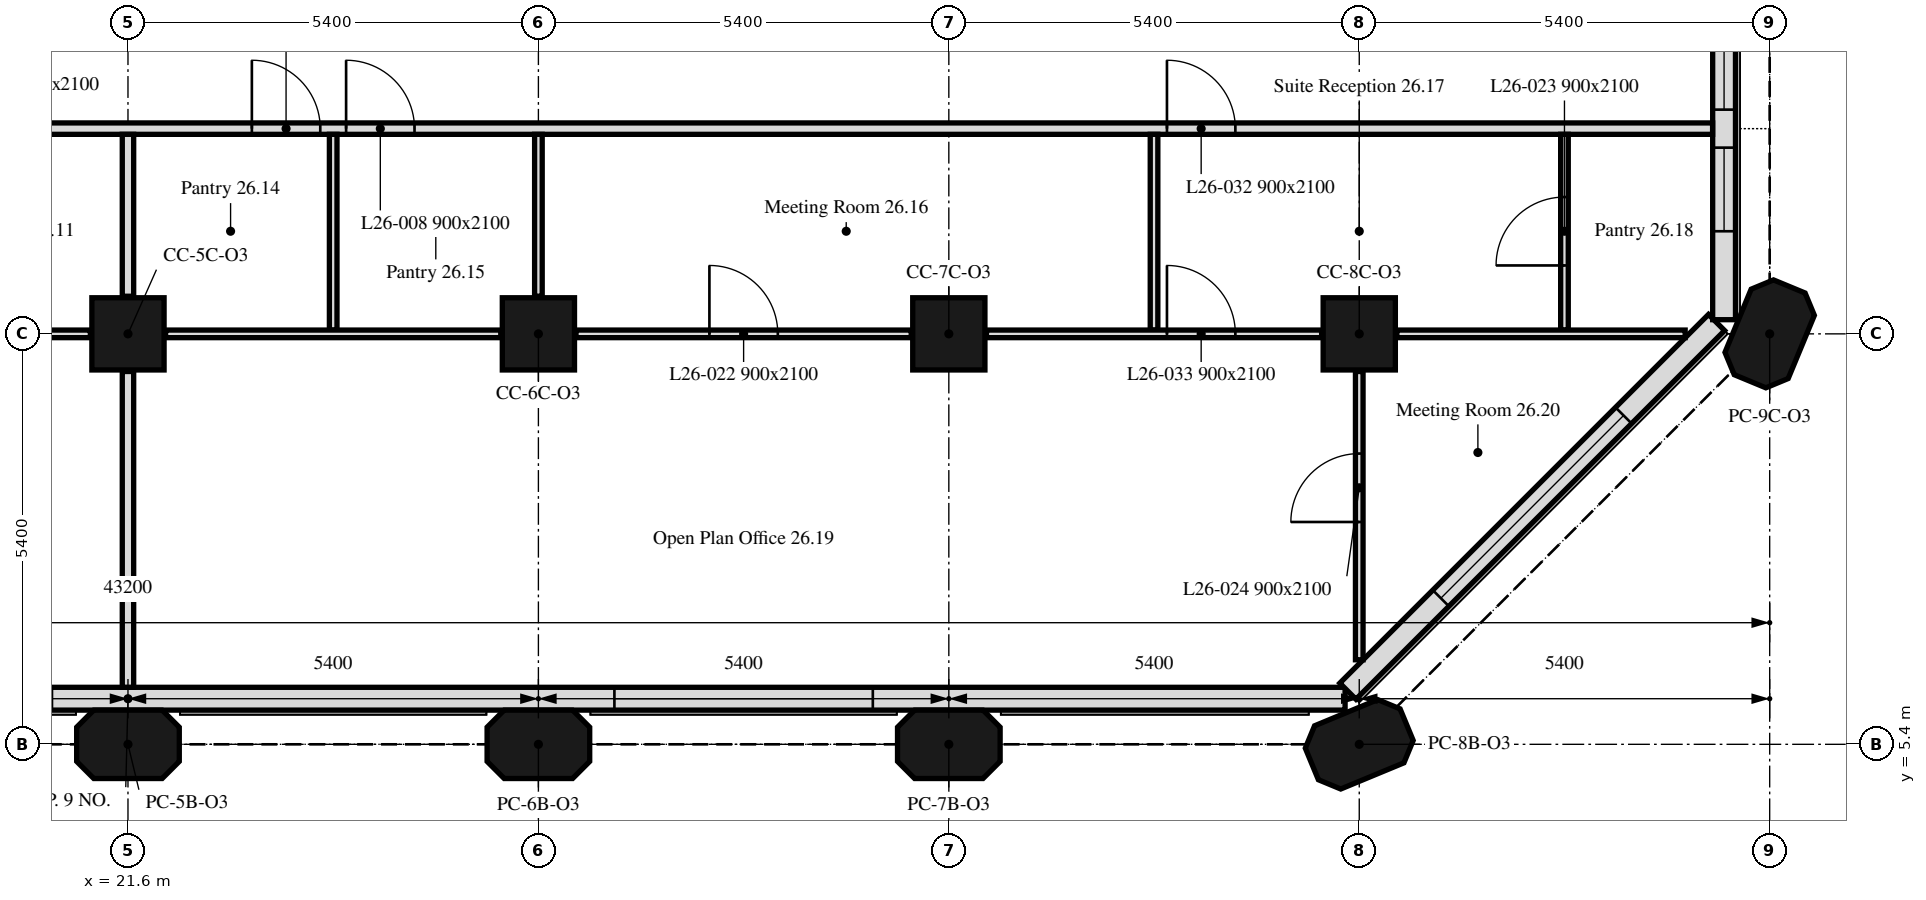
"""IFC4 building model, lengths in metres.
Left out: names, types, materials, properties, quantities, classifications, styles, units other than length and angle.
Written with IfcOpenShell. Run it as: python <this file> out.ifc"""

import sys

from ifc_helpers import new_model, si_unit, direction, frame, frame_2d, origin, origin_2d, place, context, subcontext, project, spatial, polyline, rectangle, outline, extrude, element, fill, save


model = new_model("IFC4")
c1 = context("Model", 3, precision=1e-05, world=origin(), true_north=direction((0.0, 1.0)))
c2 = subcontext(c1, "Body", "Model", "MODEL_VIEW")
j1 = project(units=[si_unit("LENGTHUNIT", "METRE"), si_unit("PLANEANGLEUNIT", "RADIAN")], contexts=[c1])
p1 = place(None, origin())
s1 = spatial("IfcSite", under=j1, at=p1, CompositionType="ELEMENT")
p2 = place(p1, origin())
s2 = spatial("IfcBuilding", under=s1, at=p2, CompositionType="ELEMENT")
p3 = place(p2, frame((0.0, 0.0, 110.6)))
s3 = spatial("IfcBuildingStorey", under=s2, at=p3, CompositionType="ELEMENT", Elevation=110.6)
for number, where, z_axis, x_axis in (
    (1, (21.6, 5.4, 0.0), (0.0, 0.0, 1.0), (1.0, 0.0, 0.0)),
    (2, (27.0, 5.4, 0.0), (0.0, 0.0, 1.0), (1.0, 0.0, 0.0)),
    (3, (32.4, 5.4, 0.0), (0.0, 0.0, 1.0), (1.0, 0.0, 0.0)),
    (4, (37.8, 5.4, 0.0), (0.0, 0.0, 1.0), (0.924, 0.383, 0.0)),
):
    element("IfcColumn", number, at=place(p3, frame(where, z_axis=z_axis, x_axis=x_axis)), inside=s3, PredefinedType="COLUMN", context=c2, shape_type="SweptSolid", body=[
        extrude(outline(polyline([(-0.45, -0.45), (0.45, -0.45), (0.675, -0.225), (0.675, 0.225), (0.45, 0.45), (-0.45, 0.45), (-0.675, 0.225), (-0.675, -0.225), (-0.45, -0.45)])), origin(), (0.0, 0.0, 1.0), 3.5),
    ])
for number, where, z_axis, x_axis in (
    (5, (21.6, 10.8, 0.0), (0.0, 0.0, 1.0), (1.0, 0.0, 0.0)),
    (6, (27.0, 10.8, 0.0), (0.0, 0.0, 1.0), (1.0, 0.0, 0.0)),
    (7, (32.4, 10.8, 0.0), (0.0, 0.0, 1.0), (1.0, 0.0, 0.0)),
    (8, (37.8, 10.8, 0.0), (0.0, 0.0, 1.0), (1.0, 0.0, 0.0)),
):
    element("IfcColumn", number, at=place(p3, frame(where, z_axis=z_axis, x_axis=x_axis)), inside=s3, PredefinedType="COLUMN", context=c2, shape_type="SweptSolid", body=[
        extrude(rectangle(XDim=0.95, YDim=0.95, at=origin_2d()), origin(), (0.0, 0.0, 1.0), 3.5),
    ])
p4 = place(p3, frame((43.2, 10.8, 0.0), z_axis=(0.0, 0.0, 1.0), x_axis=(0.382683432365, 0.923879532511, 0.0)))
e9 = element("IfcColumn", 9, at=p4, inside=s3, PredefinedType="COLUMN", context=c2, shape_type="SweptSolid", body=[
    extrude(outline(polyline([(-0.45, -0.45), (0.45, -0.45), (0.675, -0.225), (0.675, 0.225), (0.45, 0.45), (-0.45, 0.45), (-0.675, 0.225), (-0.675, -0.225), (-0.45, -0.45)])), origin(), (0.0, 0.0, 1.0), 3.5),
])
p5 = place(p3, frame((5.586, 6.0, 0.0), z_axis=(0.0, 0.0, 1.0), x_axis=(1.0, 0.0, 0.0)))
e10 = element("IfcWall", 10, at=p5, inside=s3, PredefinedType="SOLIDWALL", context=c2, shape_type="SweptSolid", body=[
    extrude(rectangle(XDim=32.027, YDim=0.3, at=frame_2d((16.014, 0.0))), origin(), (0.0, 0.0, 1.0), 3.5),
])
p6 = place(p5, frame((0.814, 0.0, 0.9)))
e11 = element("IfcOpeningElement", 11, at=p6, cuts=e10, PredefinedType="OPENING", context=c2, shape_type="SweptSolid", body=[
    extrude(rectangle(XDim=3.4, YDim=1.7, at=frame_2d((1.7, 0.85))), frame((0.0, 0.16, 0.0), z_axis=(0.0, -1.0, 0.0), x_axis=(1.0, 0.0, 0.0)), (0.0, 0.0, 1.0), 0.32),
])
p7 = place(p5, frame((11.614, 0.0, 0.9)))
e12 = element("IfcOpeningElement", 12, at=p7, cuts=e10, PredefinedType="OPENING", context=c2, shape_type="SweptSolid", body=[
    extrude(rectangle(XDim=3.4, YDim=1.7, at=frame_2d((1.7, 0.85))), frame((0.0, 0.16, 0.0), z_axis=(0.0, -1.0, 0.0), x_axis=(1.0, 0.0, 0.0)), (0.0, 0.0, 1.0), 0.32),
])
p8 = place(p5, frame((22.414, 0.0, 0.9)))
e13 = element("IfcOpeningElement", 13, at=p8, cuts=e10, PredefinedType="OPENING", context=c2, shape_type="SweptSolid", body=[
    extrude(rectangle(XDim=3.4, YDim=1.7, at=frame_2d((1.7, 0.85))), frame((0.0, 0.16, 0.0), z_axis=(0.0, -1.0, 0.0), x_axis=(1.0, 0.0, 0.0)), (0.0, 0.0, 1.0), 0.32),
])
p9 = place(p3, frame((37.65, 6.099, 0.0), z_axis=(0.0, 0.0, 1.0), x_axis=(0.707106781187, 0.707106781187, 0.0)))
e14 = element("IfcWall", 14, at=p9, inside=s3, PredefinedType="SOLIDWALL", context=c2, shape_type="SweptSolid", body=[
    extrude(rectangle(XDim=6.86, YDim=0.3, at=frame_2d((3.43, 0.0))), origin(), (0.0, 0.0, 1.0), 3.5),
])
p10 = place(p9, frame((1.73, 0.0, 0.9)))
e15 = element("IfcOpeningElement", 15, at=p10, cuts=e14, PredefinedType="OPENING", context=c2, shape_type="SweptSolid", body=[
    extrude(rectangle(XDim=3.4, YDim=1.7, at=frame_2d((1.7, 0.85))), frame((0.0, 0.16, 0.0), z_axis=(0.0, -1.0, 0.0), x_axis=(1.0, 0.0, 0.0)), (0.0, 0.0, 1.0), 0.32),
])
p11 = place(p3, frame((42.6, 10.986, 0.0), z_axis=(0.0, 0.0, 1.0), x_axis=(0.0, 1.0, 0.0)))
e16 = element("IfcWall", 16, at=p11, inside=s3, PredefinedType="SOLIDWALL", context=c2, shape_type="SweptSolid", body=[
    extrude(rectangle(XDim=5.214, YDim=0.3, at=frame_2d((2.607, 0.0))), origin(), (0.0, 0.0, 1.0), 3.5),
])
p12 = place(p11, frame((1.164, 0.0, 0.9)))
e17 = element("IfcOpeningElement", 17, at=p12, cuts=e16, PredefinedType="OPENING", context=c2, shape_type="SweptSolid", body=[
    extrude(rectangle(XDim=1.1, YDim=1.7, at=frame_2d((0.55, 0.85))), frame((0.0, 0.16, 0.0), z_axis=(0.0, -1.0, 0.0), x_axis=(1.0, 0.0, 0.0)), (0.0, 0.0, 1.0), 0.32),
])
p13 = place(p11, frame((2.764, 0.0, 0.9)))
e18 = element("IfcOpeningElement", 18, at=p13, cuts=e16, PredefinedType="OPENING", context=c2, shape_type="SweptSolid", body=[
    extrude(rectangle(XDim=1.1, YDim=1.7, at=frame_2d((0.55, 0.85))), frame((0.0, 0.16, 0.0), z_axis=(0.0, -1.0, 0.0), x_axis=(1.0, 0.0, 0.0)), (0.0, 0.0, 1.0), 0.32),
])
p14 = place(p3, frame((0.751, 13.5, 0.0), z_axis=(0.0, 0.0, 1.0), x_axis=(1.0, 0.0, 0.0)))
e19 = element("IfcWall", 19, at=p14, inside=s3, PredefinedType="PARTITIONING", context=c2, shape_type="SweptSolid", body=[
    extrude(rectangle(XDim=41.698, YDim=0.15, at=frame_2d((20.849, 0.0))), origin(), (0.0, 0.0, 1.0), 3.5),
])
p15 = place(p14, frame((6.279, 0.0, 0.0)))
e20 = element("IfcOpeningElement", 20, at=p15, cuts=e19, PredefinedType="OPENING", context=c2, shape_type="SweptSolid", body=[
    extrude(rectangle(XDim=0.9, YDim=2.1, at=frame_2d((0.45, 1.05))), frame((0.0, 0.075, 0.0), z_axis=(0.0, -1.0, 0.0), x_axis=(1.0, 0.0, 0.0)), (0.0, 0.0, 1.0), 0.15),
])
p16 = place(p14, frame((7.519, 0.0, 0.0)))
e21 = element("IfcOpeningElement", 21, at=p16, cuts=e19, PredefinedType="OPENING", context=c2, shape_type="SweptSolid", body=[
    extrude(rectangle(XDim=0.9, YDim=2.1, at=frame_2d((0.45, 1.05))), frame((0.0, 0.075, 0.0), z_axis=(0.0, -1.0, 0.0), x_axis=(1.0, 0.0, 0.0)), (0.0, 0.0, 1.0), 0.15),
])
p17 = place(p14, frame((11.679, 0.0, 0.0)))
e22 = element("IfcOpeningElement", 22, at=p17, cuts=e19, PredefinedType="OPENING", context=c2, shape_type="SweptSolid", body=[
    extrude(rectangle(XDim=0.9, YDim=2.1, at=frame_2d((0.45, 1.05))), frame((0.0, 0.075, 0.0), z_axis=(0.0, -1.0, 0.0), x_axis=(1.0, 0.0, 0.0)), (0.0, 0.0, 1.0), 0.15),
])
p18 = place(p14, frame((22.479, 0.0, 0.0)))
e23 = element("IfcOpeningElement", 23, at=p18, cuts=e19, PredefinedType="OPENING", context=c2, shape_type="SweptSolid", body=[
    extrude(rectangle(XDim=0.9, YDim=2.1, at=frame_2d((0.45, 1.05))), frame((0.0, 0.075, 0.0), z_axis=(0.0, -1.0, 0.0), x_axis=(1.0, 0.0, 0.0)), (0.0, 0.0, 1.0), 0.15),
])
p19 = place(p14, frame((23.719, 0.0, 0.0)))
e24 = element("IfcOpeningElement", 24, at=p19, cuts=e19, PredefinedType="OPENING", context=c2, shape_type="SweptSolid", body=[
    extrude(rectangle(XDim=0.9, YDim=2.1, at=frame_2d((0.45, 1.05))), frame((0.0, 0.075, 0.0), z_axis=(0.0, -1.0, 0.0), x_axis=(1.0, 0.0, 0.0)), (0.0, 0.0, 1.0), 0.15),
])
p20 = place(p14, frame((2.174, 0.0, 0.0)))
e25 = element("IfcOpeningElement", 25, at=p20, cuts=e19, PredefinedType="OPENING", context=c2, shape_type="SweptSolid", body=[
    extrude(rectangle(XDim=0.9, YDim=2.1, at=frame_2d((0.45, 1.05))), frame((0.0, 0.075, 0.0), z_axis=(0.0, -1.0, 0.0), x_axis=(1.0, 0.0, 0.0)), (0.0, 0.0, 1.0), 0.15),
])
p21 = place(p14, frame((17.079, 0.0, 0.0)))
e26 = element("IfcOpeningElement", 26, at=p21, cuts=e19, PredefinedType="OPENING", context=c2, shape_type="SweptSolid", body=[
    extrude(rectangle(XDim=0.9, YDim=2.1, at=frame_2d((0.45, 1.05))), frame((0.0, 0.075, 0.0), z_axis=(0.0, -1.0, 0.0), x_axis=(1.0, 0.0, 0.0)), (0.0, 0.0, 1.0), 0.15),
])
p22 = place(p14, frame((34.519, 0.0, 0.0)))
e27 = element("IfcOpeningElement", 27, at=p22, cuts=e19, PredefinedType="OPENING", context=c2, shape_type="SweptSolid", body=[
    extrude(rectangle(XDim=0.9, YDim=2.1, at=frame_2d((0.45, 1.05))), frame((0.0, 0.075, 0.0), z_axis=(0.0, -1.0, 0.0), x_axis=(1.0, 0.0, 0.0)), (0.0, 0.0, 1.0), 0.15),
])
p23 = place(p3, frame((16.695, 10.8, 0.0), z_axis=(0.0, 0.0, 1.0), x_axis=(1.0, 0.0, 0.0)))
e28 = element("IfcWall", 28, at=p23, inside=s3, PredefinedType="PARTITIONING", context=c2, shape_type="SweptSolid", body=[
    extrude(rectangle(XDim=4.41, YDim=0.1, at=frame_2d((2.205, 0.0))), origin(), (0.0, 0.0, 1.0), 3.5),
])
p24 = place(p3, frame((21.6, 11.295, 0.0), z_axis=(0.0, 0.0, 1.0), x_axis=(0.0, 1.0, 0.0)))
e29 = element("IfcWall", 29, at=p24, inside=s3, PredefinedType="PARTITIONING", context=c2, shape_type="SweptSolid", body=[
    extrude(rectangle(XDim=2.13, YDim=0.15, at=frame_2d((1.065, 0.0))), origin(), (0.0, 0.0, 1.0), 3.5),
])
p25 = place(p3, frame((21.6, 6.151, 0.0), z_axis=(0.0, 0.0, 1.0), x_axis=(0.0, 1.0, 0.0)))
e30 = element("IfcWall", 30, at=p25, inside=s3, PredefinedType="PARTITIONING", context=c2, shape_type="SweptSolid", body=[
    extrude(rectangle(XDim=4.154, YDim=0.15, at=frame_2d((2.077, 0.0))), origin(), (0.0, 0.0, 1.0), 3.5),
])
p26 = place(p3, frame((24.3, 10.85, 0.0), z_axis=(0.0, 0.0, 1.0), x_axis=(0.0, 1.0, 0.0)))
e31 = element("IfcWall", 31, at=p26, inside=s3, PredefinedType="PARTITIONING", context=c2, shape_type="SweptSolid", body=[
    extrude(rectangle(XDim=2.575, YDim=0.1, at=frame_2d((1.288, 0.0))), origin(), (0.0, 0.0, 1.0), 3.5),
])
p27 = place(p3, frame((22.095, 10.8, 0.0), z_axis=(0.0, 0.0, 1.0), x_axis=(1.0, 0.0, 0.0)))
e32 = element("IfcWall", 32, at=p27, inside=s3, PredefinedType="PARTITIONING", context=c2, shape_type="SweptSolid", body=[
    extrude(rectangle(XDim=4.41, YDim=0.1, at=frame_2d((2.205, 0.0))), origin(), (0.0, 0.0, 1.0), 3.5),
])
p28 = place(p3, frame((27.0, 11.295, 0.0), z_axis=(0.0, 0.0, 1.0), x_axis=(0.0, 1.0, 0.0)))
e33 = element("IfcWall", 33, at=p28, inside=s3, PredefinedType="PARTITIONING", context=c2, shape_type="SweptSolid", body=[
    extrude(rectangle(XDim=2.13, YDim=0.1, at=frame_2d((1.065, 0.0))), origin(), (0.0, 0.0, 1.0), 3.5),
])
p29 = place(p3, frame((27.495, 10.8, 0.0), z_axis=(0.0, 0.0, 1.0), x_axis=(1.0, 0.0, 0.0)))
e34 = element("IfcWall", 34, at=p29, inside=s3, PredefinedType="PARTITIONING", context=c2, shape_type="SweptSolid", body=[
    extrude(rectangle(XDim=4.41, YDim=0.1, at=frame_2d((2.205, 0.0))), origin(), (0.0, 0.0, 1.0), 3.5),
])
p30 = place(p29, frame((1.755, 0.0, 0.0)))
e35 = element("IfcOpeningElement", 35, at=p30, cuts=e34, PredefinedType="OPENING", context=c2, shape_type="SweptSolid", body=[
    extrude(rectangle(XDim=0.9, YDim=2.1, at=frame_2d((0.45, 1.05))), frame((0.0, 0.05, 0.0), z_axis=(0.0, -1.0, 0.0), x_axis=(1.0, 0.0, 0.0)), (0.0, 0.0, 1.0), 0.1),
])
p31 = place(p3, frame((35.1, 10.85, 0.0), z_axis=(0.0, 0.0, 1.0), x_axis=(0.0, 1.0, 0.0)))
e36 = element("IfcWall", 36, at=p31, inside=s3, PredefinedType="PARTITIONING", context=c2, shape_type="SweptSolid", body=[
    extrude(rectangle(XDim=2.575, YDim=0.1, at=frame_2d((1.288, 0.0))), origin(), (0.0, 0.0, 1.0), 3.5),
])
p32 = place(p3, frame((32.895, 10.8, 0.0), z_axis=(0.0, 0.0, 1.0), x_axis=(1.0, 0.0, 0.0)))
e37 = element("IfcWall", 37, at=p32, inside=s3, PredefinedType="PARTITIONING", context=c2, shape_type="SweptSolid", body=[
    extrude(rectangle(XDim=4.41, YDim=0.1, at=frame_2d((2.205, 0.0))), origin(), (0.0, 0.0, 1.0), 3.5),
])
p33 = place(p32, frame((2.375, 0.0, 0.0)))
e38 = element("IfcOpeningElement", 38, at=p33, cuts=e37, PredefinedType="OPENING", context=c2, shape_type="SweptSolid", body=[
    extrude(rectangle(XDim=0.9, YDim=2.1, at=frame_2d((0.45, 1.05))), frame((0.0, 0.05, 0.0), z_axis=(0.0, -1.0, 0.0), x_axis=(1.0, 0.0, 0.0)), (0.0, 0.0, 1.0), 0.1),
])
p34 = place(p3, frame((40.5, 10.85, 0.0), z_axis=(0.0, 0.0, 1.0), x_axis=(0.0, 1.0, 0.0)))
e39 = element("IfcWall", 39, at=p34, inside=s3, PredefinedType="PARTITIONING", context=c2, shape_type="SweptSolid", body=[
    extrude(rectangle(XDim=2.575, YDim=0.1, at=frame_2d((1.288, 0.0))), origin(), (0.0, 0.0, 1.0), 3.5),
])
p35 = place(p34, frame((0.85, 0.0, 0.0)))
e40 = element("IfcOpeningElement", 40, at=p35, cuts=e39, PredefinedType="OPENING", context=c2, shape_type="SweptSolid", body=[
    extrude(rectangle(XDim=0.9, YDim=2.1, at=frame_2d((0.45, 1.05))), frame((0.0, 0.05, 0.0), z_axis=(0.0, -1.0, 0.0), x_axis=(1.0, 0.0, 0.0)), (0.0, 0.0, 1.0), 0.1),
])
p36 = place(p3, frame((38.295, 10.8, 0.0), z_axis=(0.0, 0.0, 1.0), x_axis=(1.0, 0.0, 0.0)))
e41 = element("IfcWall", 41, at=p36, inside=s3, PredefinedType="PARTITIONING", context=c2, shape_type="SweptSolid", body=[
    extrude(rectangle(XDim=3.793, YDim=0.1, at=frame_2d((1.896, 0.0))), origin(), (0.0, 0.0, 1.0), 3.5),
])
p37 = place(p3, frame((37.8, 6.512, 0.0), z_axis=(0.0, 0.0, 1.0), x_axis=(0.0, 1.0, 0.0)))
e42 = element("IfcWall", 42, at=p37, inside=s3, PredefinedType="PARTITIONING", context=c2, shape_type="SweptSolid", body=[
    extrude(rectangle(XDim=3.793, YDim=0.1, at=frame_2d((1.896, 0.0))), origin(), (0.0, 0.0, 1.0), 3.5),
])
p38 = place(p37, frame((1.813, 0.0, 0.0)))
e43 = element("IfcOpeningElement", 43, at=p38, cuts=e42, PredefinedType="OPENING", context=c2, shape_type="SweptSolid", body=[
    extrude(rectangle(XDim=0.9, YDim=2.1, at=frame_2d((0.45, 1.05))), frame((0.0, 0.05, 0.0), z_axis=(0.0, -1.0, 0.0), x_axis=(1.0, 0.0, 0.0)), (0.0, 0.0, 1.0), 0.1),
])
p39 = place(p8, origin())
e44 = element("IfcWindow", 44, at=p39, inside=s3, PartitioningType="SINGLE_PANEL", PredefinedType="WINDOW", context=c2, shape_type="SweptSolid", body=[
    extrude(rectangle(XDim=3.4, YDim=1.7, at=frame_2d((1.7, 0.85))), frame((0.0, 0.03, 0.0), z_axis=(0.0, -1.0, 0.0), x_axis=(1.0, 0.0, 0.0)), (0.0, 0.0, 1.0), 0.06),
])
fill(e13, e44)
p40 = place(p10, origin())
e45 = element("IfcWindow", 45, at=p40, inside=s3, PartitioningType="SINGLE_PANEL", PredefinedType="WINDOW", context=c2, shape_type="SweptSolid", body=[
    extrude(rectangle(XDim=3.4, YDim=1.7, at=frame_2d((1.7, 0.85))), frame((0.0, 0.03, 0.0), z_axis=(0.0, -1.0, 0.0), x_axis=(1.0, 0.0, 0.0)), (0.0, 0.0, 1.0), 0.06),
])
fill(e15, e45)
p41 = place(p12, origin())
e46 = element("IfcWindow", 46, at=p41, inside=s3, PartitioningType="SINGLE_PANEL", PredefinedType="WINDOW", context=c2, shape_type="SweptSolid", body=[
    extrude(rectangle(XDim=1.1, YDim=1.7, at=frame_2d((0.55, 0.85))), frame((0.0, 0.03, 0.0), z_axis=(0.0, -1.0, 0.0), x_axis=(1.0, 0.0, 0.0)), (0.0, 0.0, 1.0), 0.06),
])
fill(e17, e46)
p42 = place(p13, origin())
e47 = element("IfcWindow", 47, at=p42, inside=s3, PartitioningType="SINGLE_PANEL", PredefinedType="WINDOW", context=c2, shape_type="SweptSolid", body=[
    extrude(rectangle(XDim=1.1, YDim=1.7, at=frame_2d((0.55, 0.85))), frame((0.0, 0.03, 0.0), z_axis=(0.0, -1.0, 0.0), x_axis=(1.0, 0.0, 0.0)), (0.0, 0.0, 1.0), 0.06),
])
fill(e18, e47)
p43 = place(p18, origin())
e48 = element("IfcDoor", 48, at=p43, inside=s3, OperationType="SINGLE_SWING_RIGHT", PredefinedType="DOOR", context=c2, shape_type="SweptSolid", body=[
    extrude(rectangle(XDim=0.9, YDim=2.1, at=frame_2d((0.45, 1.05))), frame((0.0, 0.025, 0.0), z_axis=(0.0, -1.0, 0.0), x_axis=(1.0, 0.0, 0.0)), (0.0, 0.0, 1.0), 0.05),
])
fill(e23, e48)
p44 = place(p19, origin())
e49 = element("IfcDoor", 49, at=p44, inside=s3, OperationType="SINGLE_SWING_RIGHT", PredefinedType="DOOR", context=c2, shape_type="SweptSolid", body=[
    extrude(rectangle(XDim=0.9, YDim=2.1, at=frame_2d((0.45, 1.05))), frame((0.0, 0.025, 0.0), z_axis=(0.0, -1.0, 0.0), x_axis=(1.0, 0.0, 0.0)), (0.0, 0.0, 1.0), 0.05),
])
fill(e24, e49)
p45 = place(p30, origin())
e50 = element("IfcDoor", 50, at=p45, inside=s3, OperationType="SINGLE_SWING_RIGHT", PredefinedType="DOOR", context=c2, shape_type="SweptSolid", body=[
    extrude(rectangle(XDim=0.9, YDim=2.1, at=frame_2d((0.45, 1.05))), frame((0.0, 0.025, 0.0), z_axis=(0.0, -1.0, 0.0), x_axis=(1.0, 0.0, 0.0)), (0.0, 0.0, 1.0), 0.05),
])
fill(e35, e50)
p46 = place(p35, origin())
e51 = element("IfcDoor", 51, at=p46, inside=s3, OperationType="SINGLE_SWING_LEFT", PredefinedType="DOOR", context=c2, shape_type="SweptSolid", body=[
    extrude(rectangle(XDim=0.9, YDim=2.1, at=frame_2d((0.45, 1.05))), frame((0.0, 0.025, 0.0), z_axis=(0.0, -1.0, 0.0), x_axis=(1.0, 0.0, 0.0)), (0.0, 0.0, 1.0), 0.05),
])
fill(e40, e51)
p47 = place(p38, origin())
e52 = element("IfcDoor", 52, at=p47, inside=s3, OperationType="SINGLE_SWING_LEFT", PredefinedType="DOOR", context=c2, shape_type="SweptSolid", body=[
    extrude(rectangle(XDim=0.9, YDim=2.1, at=frame_2d((0.45, 1.05))), frame((0.0, 0.025, 0.0), z_axis=(0.0, -1.0, 0.0), x_axis=(1.0, 0.0, 0.0)), (0.0, 0.0, 1.0), 0.05),
])
fill(e43, e52)
p48 = place(p22, origin())
e53 = element("IfcDoor", 53, at=p48, inside=s3, OperationType="SINGLE_SWING_RIGHT", PredefinedType="DOOR", context=c2, shape_type="SweptSolid", body=[
    extrude(rectangle(XDim=0.9, YDim=2.1, at=frame_2d((0.45, 1.05))), frame((0.0, 0.025, 0.0), z_axis=(0.0, -1.0, 0.0), x_axis=(1.0, 0.0, 0.0)), (0.0, 0.0, 1.0), 0.05),
])
fill(e27, e53)
p49 = place(p33, origin())
e54 = element("IfcDoor", 54, at=p49, inside=s3, OperationType="SINGLE_SWING_LEFT", PredefinedType="DOOR", context=c2, shape_type="SweptSolid", body=[
    extrude(rectangle(XDim=0.9, YDim=2.1, at=frame_2d((0.45, 1.05))), frame((0.0, 0.025, 0.0), z_axis=(0.0, -1.0, 0.0), x_axis=(1.0, 0.0, 0.0)), (0.0, 0.0, 1.0), 0.05),
])
fill(e38, e54)
save(model, sys.argv[1])
